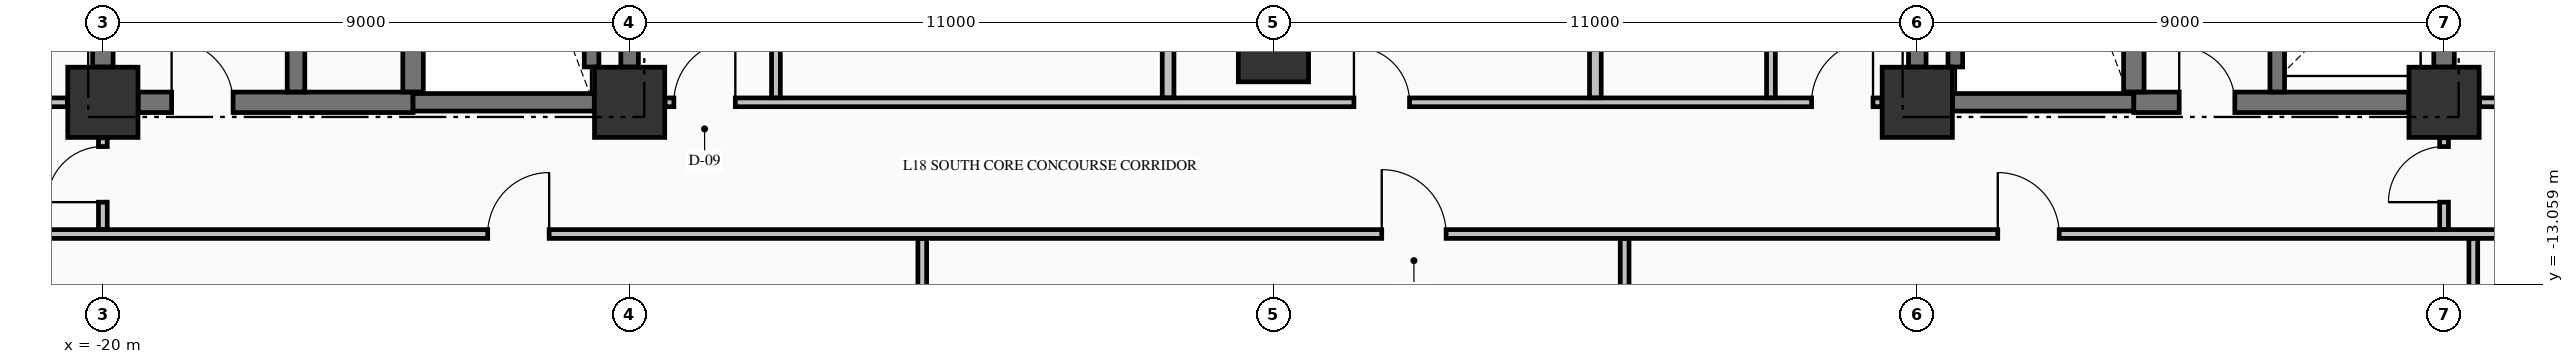
"""IFC4 building model, lengths in metres.
Left out: names, types, materials, properties, quantities, classifications, styles, units other than length and angle.
Written with IfcOpenShell. Run it as: python <this file> out.ifc"""

import sys

from ifc_helpers import new_model, si_unit, direction, frame, frame_2d, origin, origin_2d, place, context, subcontext, project, spatial, rectangle, extrude, element, fill, save


model = new_model("IFC4")
c1 = context("Model", 3, precision=1e-05, world=origin(), true_north=direction((0.0, 1.0)))
c2 = subcontext(c1, "Body", "Model", "MODEL_VIEW")
j1 = project(units=[si_unit("LENGTHUNIT", "METRE"), si_unit("PLANEANGLEUNIT", "RADIAN")], contexts=[c1])
p1 = place(None, origin())
s1 = spatial("IfcSite", under=j1, at=p1, CompositionType="ELEMENT")
p2 = place(p1, origin())
s2 = spatial("IfcBuilding", under=s1, at=p2, CompositionType="ELEMENT")
p3 = place(p2, frame((0.0, 0.0, 75.04)))
s3 = spatial("IfcBuildingStorey", under=s2, at=p3, CompositionType="ELEMENT", Elevation=75.04)
for number, where, z_axis, x_axis in (
    (1, (-20.0, -9.95, -0.25), (0.0, 0.0, 1.0), (1.0, 0.0, 0.0)),
    (2, (-11.0, -9.95, -0.25), (0.0, 0.0, 1.0), (1.0, 0.0, 0.0)),
    (3, (11.0, -9.95, -0.25), (0.0, 0.0, 1.0), (1.0, 0.0, 0.0)),
    (4, (20.0, -9.95, -0.25), (0.0, 0.0, 1.0), (1.0, 0.0, 0.0)),
    (5, (0.0, -9.0, -0.25), (0.0, 0.0, 1.0), (1.0, 0.0, 0.0)),
):
    element("IfcColumn", number, at=place(p3, frame(where, z_axis=z_axis, x_axis=x_axis)), inside=s3, PredefinedType="COLUMN", context=c2, shape_type="SweptSolid", body=[
        extrude(rectangle(XDim=1.2, YDim=1.2, at=origin_2d()), origin(), (0.0, 0.0, 1.0), 3.57),
    ])
p4 = place(p3, frame((-19.396, -9.95, 0.0), z_axis=(0.0, 0.0, 1.0), x_axis=(1.0, 0.0, 0.0)))
e6 = element("IfcWall", 6, at=p4, inside=s3, PredefinedType="SHEAR", context=c2, shape_type="SweptSolid", body=[
    extrude(rectangle(XDim=4.696, YDim=0.35, at=frame_2d((2.348, 0.0))), origin(), (0.0, 0.0, 1.0), 3.32),
])
p5 = place(p4, frame((0.571, 0.0, 0.0)))
e7 = element("IfcOpeningElement", 7, at=p5, cuts=e6, PredefinedType="OPENING", context=c2, shape_type="SweptSolid", body=[
    extrude(rectangle(XDim=1.05, YDim=2.15, at=frame_2d((0.525, 1.075))), frame((0.0, 0.185, 0.0), z_axis=(0.0, -1.0, 0.0), x_axis=(1.0, 0.0, 0.0)), (0.0, 0.0, 1.0), 0.37),
])
for number, where, z_axis, x_axis in (
    (8, (-14.7, -9.95, 0.0), (0.0, 0.0, 1.0), (1.0, 0.0, 0.0)),
    (9, (11.604, -9.95, 0.0), (0.0, 0.0, 1.0), (1.0, 0.0, 0.0)),
):
    element("IfcWall", number, at=place(p3, frame(where, z_axis=z_axis, x_axis=x_axis)), inside=s3, PredefinedType="SHEAR", context=c2, shape_type="SweptSolid", body=[
        extrude(rectangle(XDim=3.096, YDim=0.3, at=frame_2d((1.548, 0.0))), origin(), (0.0, 0.0, 1.0), 3.32),
    ])
p6 = place(p3, frame((14.7, -9.95, 0.0), z_axis=(0.0, 0.0, 1.0), x_axis=(1.0, 0.0, 0.0)))
e10 = element("IfcWall", 10, at=p6, inside=s3, PredefinedType="SHEAR", context=c2, shape_type="SweptSolid", body=[
    extrude(rectangle(XDim=4.696, YDim=0.35, at=frame_2d((2.348, 0.0))), origin(), (0.0, 0.0, 1.0), 3.32),
])
p7 = place(p6, frame((0.775, 0.0, 0.0)))
e11 = element("IfcOpeningElement", 11, at=p7, cuts=e10, PredefinedType="OPENING", context=c2, shape_type="SweptSolid", body=[
    extrude(rectangle(XDim=0.95, YDim=2.15, at=frame_2d((0.475, 1.075))), frame((0.0, 0.185, 0.0), z_axis=(0.0, -1.0, 0.0), x_axis=(1.0, 0.0, 0.0)), (0.0, 0.0, 1.0), 0.37),
])
p8 = place(p3, frame((-28.835, -12.2, 0.0), z_axis=(0.0, 0.0, 1.0), x_axis=(1.0, 0.0, 0.0)))
e12 = element("IfcWall", 12, at=p8, inside=s3, PredefinedType="PARTITIONING", context=c2, shape_type="SweptSolid", body=[
    extrude(rectangle(XDim=52.67, YDim=0.15, at=frame_2d((26.335, 0.0))), origin(), (0.0, 0.0, 1.0), 3.32),
])
p9 = place(p8, frame((30.685, 0.0, 0.0)))
e13 = element("IfcOpeningElement", 13, at=p9, cuts=e12, PredefinedType="OPENING", context=c2, shape_type="SweptSolid", body=[
    extrude(rectangle(XDim=1.1, YDim=2.15, at=frame_2d((0.55, 1.075))), frame((0.0, 0.085, 0.0), z_axis=(0.0, -1.0, 0.0), x_axis=(1.0, 0.0, 0.0)), (0.0, 0.0, 1.0), 0.17),
])
p10 = place(p8, frame((15.41, 0.0, 0.0)))
e14 = element("IfcOpeningElement", 14, at=p10, cuts=e12, PredefinedType="OPENING", context=c2, shape_type="SweptSolid", body=[
    extrude(rectangle(XDim=1.05, YDim=2.15, at=frame_2d((0.525, 1.075))), frame((0.0, 0.085, 0.0), z_axis=(0.0, -1.0, 0.0), x_axis=(1.0, 0.0, 0.0)), (0.0, 0.0, 1.0), 0.17),
])
p11 = place(p8, frame((41.21, 0.0, 0.0)))
e15 = element("IfcOpeningElement", 15, at=p11, cuts=e12, PredefinedType="OPENING", context=c2, shape_type="SweptSolid", body=[
    extrude(rectangle(XDim=1.05, YDim=2.15, at=frame_2d((0.525, 1.075))), frame((0.0, 0.085, 0.0), z_axis=(0.0, -1.0, 0.0), x_axis=(1.0, 0.0, 0.0)), (0.0, 0.0, 1.0), 0.17),
])
p12 = place(p3, frame((-28.835, -9.95, 0.0), z_axis=(0.0, 0.0, 1.0), x_axis=(1.0, 0.0, 0.0)))
e16 = element("IfcWall", 16, at=p12, inside=s3, PredefinedType="PARTITIONING", context=c2, shape_type="SweptSolid", body=[
    extrude(rectangle(XDim=8.229, YDim=0.15, at=frame_2d((4.115, 0.0))), origin(), (0.0, 0.0, 1.0), 3.32),
])
p13 = place(p12, frame((3.835, 0.0, 0.0)))
e17 = element("IfcOpeningElement", 17, at=p13, cuts=e16, PredefinedType="OPENING", context=c2, shape_type="SweptSolid", body=[
    extrude(rectangle(XDim=1.0, YDim=2.15, at=frame_2d((0.5, 1.075))), frame((0.0, 0.085, 0.0), z_axis=(0.0, -1.0, 0.0), x_axis=(1.0, 0.0, 0.0)), (0.0, 0.0, 1.0), 0.17),
])
p14 = place(p3, frame((-10.394, -9.95, 0.0), z_axis=(0.0, 0.0, 1.0), x_axis=(1.0, 0.0, 0.0)))
e18 = element("IfcWall", 18, at=p14, inside=s3, PredefinedType="PARTITIONING", context=c2, shape_type="SweptSolid", body=[
    extrude(rectangle(XDim=20.788, YDim=0.15, at=frame_2d((10.394, 0.0))), origin(), (0.0, 0.0, 1.0), 3.32),
])
p15 = place(p14, frame((0.15, 0.0, 0.0)))
e19 = element("IfcOpeningElement", 19, at=p15, cuts=e18, PredefinedType="OPENING", context=c2, shape_type="SweptSolid", body=[
    extrude(rectangle(XDim=1.05, YDim=2.15, at=frame_2d((0.525, 1.075))), frame((0.0, 0.085, 0.0), z_axis=(0.0, -1.0, 0.0), x_axis=(1.0, 0.0, 0.0)), (0.0, 0.0, 1.0), 0.17),
])
p16 = place(p14, frame((19.588, 0.0, 0.0)))
e20 = element("IfcOpeningElement", 20, at=p16, cuts=e18, PredefinedType="OPENING", context=c2, shape_type="SweptSolid", body=[
    extrude(rectangle(XDim=1.05, YDim=2.15, at=frame_2d((0.525, 1.075))), frame((0.0, 0.085, 0.0), z_axis=(0.0, -1.0, 0.0), x_axis=(1.0, 0.0, 0.0)), (0.0, 0.0, 1.0), 0.17),
])
p17 = place(p14, frame((11.769, 0.0, 0.0)))
e21 = element("IfcOpeningElement", 21, at=p17, cuts=e18, PredefinedType="OPENING", context=c2, shape_type="SweptSolid", body=[
    extrude(rectangle(XDim=0.95, YDim=2.15, at=frame_2d((0.475, 1.075))), frame((0.0, 0.085, 0.0), z_axis=(0.0, -1.0, 0.0), x_axis=(1.0, 0.0, 0.0)), (0.0, 0.0, 1.0), 0.17),
])
p18 = place(p3, frame((20.606, -9.95, 0.0), z_axis=(0.0, 0.0, 1.0), x_axis=(1.0, 0.0, 0.0)))
e22 = element("IfcWall", 22, at=p18, inside=s3, PredefinedType="PARTITIONING", context=c2, shape_type="SweptSolid", body=[
    extrude(rectangle(XDim=3.229, YDim=0.15, at=frame_2d((1.615, 0.0))), origin(), (0.0, 0.0, 1.0), 3.32),
])
p19 = place(p18, frame((0.919, 0.0, 0.0)))
e23 = element("IfcOpeningElement", 23, at=p19, cuts=e22, PredefinedType="OPENING", context=c2, shape_type="SweptSolid", body=[
    extrude(rectangle(XDim=0.95, YDim=2.15, at=frame_2d((0.475, 1.075))), frame((0.0, 0.085, 0.0), z_axis=(0.0, -1.0, 0.0), x_axis=(1.0, 0.0, 0.0)), (0.0, 0.0, 1.0), 0.17),
])
p20 = place(p3, frame((-20.0, -9.346, 0.0), z_axis=(0.0, 0.0, 1.0), x_axis=(0.0, 1.0, 0.0)))
e24 = element("IfcWall", 24, at=p20, inside=s3, PredefinedType="SHEAR", context=c2, shape_type="SweptSolid", body=[
    extrude(rectangle(XDim=8.742, YDim=0.35, at=frame_2d((4.371, 0.0))), origin(), (0.0, 0.0, 1.0), 3.32),
])
p21 = place(p3, frame((-16.7, -9.773, 0.0), z_axis=(0.0, 0.0, 1.0), x_axis=(0.0, 1.0, 0.0)))
e25 = element("IfcWall", 25, at=p21, inside=s3, PredefinedType="SHEAR", context=c2, shape_type="SweptSolid", body=[
    extrude(rectangle(XDim=9.371, YDim=0.3, at=frame_2d((4.686, 0.0))), origin(), (0.0, 0.0, 1.0), 3.32),
])
p22 = place(p3, frame((-14.7, -9.773, 0.0), z_axis=(0.0, 0.0, 1.0), x_axis=(0.0, 1.0, 0.0)))
e26 = element("IfcWall", 26, at=p22, inside=s3, PredefinedType="SHEAR", context=c2, shape_type="SweptSolid", body=[
    extrude(rectangle(XDim=9.371, YDim=0.35, at=frame_2d((4.686, 0.0))), origin(), (0.0, 0.0, 1.0), 3.32),
])
p23 = place(p3, frame((-11.65, -9.346, 0.0), z_axis=(0.0, 0.0, 1.0), x_axis=(0.0, 1.0, 0.0)))
e27 = element("IfcWall", 27, at=p23, inside=s3, PredefinedType="SOLIDWALL", context=c2, shape_type="SweptSolid", body=[
    extrude(rectangle(XDim=8.742, YDim=0.25, at=frame_2d((4.371, 0.0))), origin(), (0.0, 0.0, 1.0), 3.32),
])
for number, where, z_axis, x_axis in (
    (28, (-11.0, -9.346, 0.0), (0.0, 0.0, 1.0), (0.0, 1.0, 0.0)),
    (29, (11.0, -9.346, 0.0), (0.0, 0.0, 1.0), (0.0, 1.0, 0.0)),
):
    element("IfcWall", number, at=place(p3, frame(where, z_axis=z_axis, x_axis=x_axis)), inside=s3, PredefinedType="SHEAR", context=c2, shape_type="SweptSolid", body=[
        extrude(rectangle(XDim=8.742, YDim=0.3, at=frame_2d((4.371, 0.0))), origin(), (0.0, 0.0, 1.0), 3.32),
    ])
p24 = place(p3, frame((11.65, -9.346, 0.0), z_axis=(0.0, 0.0, 1.0), x_axis=(0.0, 1.0, 0.0)))
e30 = element("IfcWall", 30, at=p24, inside=s3, PredefinedType="SOLIDWALL", context=c2, shape_type="SweptSolid", body=[
    extrude(rectangle(XDim=8.742, YDim=0.25, at=frame_2d((4.371, 0.0))), origin(), (0.0, 0.0, 1.0), 3.32),
])
p25 = place(p3, frame((14.7, -9.773, 0.0), z_axis=(0.0, 0.0, 1.0), x_axis=(0.0, 1.0, 0.0)))
e31 = element("IfcWall", 31, at=p25, inside=s3, PredefinedType="SHEAR", context=c2, shape_type="SweptSolid", body=[
    extrude(rectangle(XDim=9.371, YDim=0.35, at=frame_2d((4.686, 0.0))), origin(), (0.0, 0.0, 1.0), 3.32),
])
p26 = place(p3, frame((17.15, -9.773, 0.0), z_axis=(0.0, 0.0, 1.0), x_axis=(0.0, 1.0, 0.0)))
e32 = element("IfcWall", 32, at=p26, inside=s3, PredefinedType="SOLIDWALL", context=c2, shape_type="SweptSolid", body=[
    extrude(rectangle(XDim=2.596, YDim=0.25, at=frame_2d((1.298, 0.0))), origin(), (0.0, 0.0, 1.0), 3.32),
])
p27 = place(p3, frame((20.0, -9.346, 0.0), z_axis=(0.0, 0.0, 1.0), x_axis=(0.0, 1.0, 0.0)))
e33 = element("IfcWall", 33, at=p27, inside=s3, PredefinedType="SHEAR", context=c2, shape_type="SweptSolid", body=[
    extrude(rectangle(XDim=2.169, YDim=0.35, at=frame_2d((1.084, 0.0))), origin(), (0.0, 0.0, 1.0), 3.32),
])
p28 = place(p3, frame((-20.0, -12.122, 0.0), z_axis=(0.0, 0.0, 1.0), x_axis=(0.0, 1.0, 0.0)))
e34 = element("IfcWall", 34, at=p28, inside=s3, PredefinedType="PARTITIONING", context=c2, shape_type="SweptSolid", body=[
    extrude(rectangle(XDim=1.566, YDim=0.15, at=frame_2d((0.783, 0.0))), origin(), (0.0, 0.0, 1.0), 2.66),
])
p29 = place(p28, frame((0.466, 0.0, 0.0)))
e35 = element("IfcOpeningElement", 35, at=p29, cuts=e34, PredefinedType="OPENING", context=c2, shape_type="SweptSolid", body=[
    extrude(rectangle(XDim=0.95, YDim=2.15, at=frame_2d((0.475, 1.075))), frame((0.0, 0.085, 0.0), z_axis=(0.0, -1.0, 0.0), x_axis=(1.0, 0.0, 0.0)), (0.0, 0.0, 1.0), 0.17),
])
p30 = place(p3, frame((-8.5, -9.872, 0.0), z_axis=(0.0, 0.0, 1.0), x_axis=(0.0, 1.0, 0.0)))
e36 = element("IfcWall", 36, at=p30, inside=s3, PredefinedType="PARTITIONING", context=c2, shape_type="SweptSolid", body=[
    extrude(rectangle(XDim=10.569, YDim=0.15, at=frame_2d((5.285, 0.0))), origin(), (0.0, 0.0, 1.0), 3.32),
])
p31 = place(p30, frame((4.827, 0.0, 0.0)))
e37 = element("IfcOpeningElement", 37, at=p31, cuts=e36, PredefinedType="OPENING", context=c2, shape_type="SweptSolid", body=[
    extrude(rectangle(XDim=0.95, YDim=2.15, at=frame_2d((0.475, 1.075))), frame((0.0, 0.085, 0.0), z_axis=(0.0, -1.0, 0.0), x_axis=(1.0, 0.0, 0.0)), (0.0, 0.0, 1.0), 0.17),
])
p32 = place(p3, frame((-6.0, -18.472, 0.0), z_axis=(0.0, 0.0, 1.0), x_axis=(0.0, 1.0, 0.0)))
e38 = element("IfcWall", 38, at=p32, inside=s3, PredefinedType="PARTITIONING", context=c2, shape_type="SweptSolid", body=[
    extrude(rectangle(XDim=6.194, YDim=0.15, at=frame_2d((3.097, 0.0))), origin(), (0.0, 0.0, 1.0), 3.32),
])
for number, where, z_axis, x_axis in (
    (39, (-1.8, -9.872, 0.0), (0.0, 0.0, 1.0), (0.0, 1.0, 0.0)),
    (40, (5.5, -9.872, 0.0), (0.0, 0.0, 1.0), (0.0, 1.0, 0.0)),
):
    element("IfcWall", number, at=place(p3, frame(where, z_axis=z_axis, x_axis=x_axis)), inside=s3, PredefinedType="PARTITIONING", context=c2, shape_type="SweptSolid", body=[
        extrude(rectangle(XDim=4.969, YDim=0.2, at=frame_2d((2.484, 0.0))), origin(), (0.0, 0.0, 1.0), 3.32),
    ])
p33 = place(p3, frame((6.0, -18.472, 0.0), z_axis=(0.0, 0.0, 1.0), x_axis=(0.0, 1.0, 0.0)))
e41 = element("IfcWall", 41, at=p33, inside=s3, PredefinedType="PARTITIONING", context=c2, shape_type="SweptSolid", body=[
    extrude(rectangle(XDim=6.194, YDim=0.15, at=frame_2d((3.097, 0.0))), origin(), (0.0, 0.0, 1.0), 3.32),
])
p34 = place(p3, frame((8.5, -9.872, 0.0), z_axis=(0.0, 0.0, 1.0), x_axis=(0.0, 1.0, 0.0)))
e42 = element("IfcWall", 42, at=p34, inside=s3, PredefinedType="PARTITIONING", context=c2, shape_type="SweptSolid", body=[
    extrude(rectangle(XDim=4.969, YDim=0.15, at=frame_2d((2.484, 0.0))), origin(), (0.0, 0.0, 1.0), 3.32),
])
p35 = place(p34, frame((1.997, 0.0, 0.0)))
e43 = element("IfcOpeningElement", 43, at=p35, cuts=e42, PredefinedType="OPENING", context=c2, shape_type="SweptSolid", body=[
    extrude(rectangle(XDim=0.95, YDim=2.15, at=frame_2d((0.475, 1.075))), frame((0.0, 0.085, 0.0), z_axis=(0.0, -1.0, 0.0), x_axis=(1.0, 0.0, 0.0)), (0.0, 0.0, 1.0), 0.17),
])
p36 = place(p3, frame((20.0, -12.122, 0.0), z_axis=(0.0, 0.0, 1.0), x_axis=(0.0, 1.0, 0.0)))
e44 = element("IfcWall", 44, at=p36, inside=s3, PredefinedType="PARTITIONING", context=c2, shape_type="SweptSolid", body=[
    extrude(rectangle(XDim=1.566, YDim=0.15, at=frame_2d((0.783, 0.0))), origin(), (0.0, 0.0, 1.0), 3.32),
])
p37 = place(p36, frame((0.466, 0.0, 0.0)))
e45 = element("IfcOpeningElement", 45, at=p37, cuts=e44, PredefinedType="OPENING", context=c2, shape_type="SweptSolid", body=[
    extrude(rectangle(XDim=0.95, YDim=2.15, at=frame_2d((0.475, 1.075))), frame((0.0, 0.085, 0.0), z_axis=(0.0, -1.0, 0.0), x_axis=(1.0, 0.0, 0.0)), (0.0, 0.0, 1.0), 0.17),
])
p38 = place(p3, frame((20.5, -22.294, 0.0), z_axis=(0.0, 0.0, 1.0), x_axis=(0.0, 1.0, 0.0)))
e46 = element("IfcWall", 46, at=p38, inside=s3, PredefinedType="PARTITIONING", context=c2, shape_type="SweptSolid", body=[
    extrude(rectangle(XDim=10.016, YDim=0.15, at=frame_2d((5.008, 0.0))), origin(), (0.0, 0.0, 1.0), 3.32),
])
p39 = place(p5, origin())
e47 = element("IfcDoor", 47, at=p39, inside=s3, OperationType="SINGLE_SWING_LEFT", PredefinedType="DOOR", context=c2, shape_type="SweptSolid", body=[
    extrude(rectangle(XDim=1.05, YDim=2.15, at=frame_2d((0.525, 1.075))), frame((0.0, 0.025, 0.0), z_axis=(0.0, -1.0, 0.0), x_axis=(1.0, 0.0, 0.0)), (0.0, 0.0, 1.0), 0.05),
])
fill(e7, e47)
p40 = place(p7, origin())
e48 = element("IfcDoor", 48, at=p40, inside=s3, OperationType="SINGLE_SWING_LEFT", PredefinedType="DOOR", context=c2, shape_type="SweptSolid", body=[
    extrude(rectangle(XDim=0.95, YDim=2.15, at=frame_2d((0.475, 1.075))), frame((0.0, 0.025, 0.0), z_axis=(0.0, -1.0, 0.0), x_axis=(1.0, 0.0, 0.0)), (0.0, 0.0, 1.0), 0.05),
])
fill(e11, e48)
p41 = place(p15, origin())
e49 = element("IfcDoor", 49, at=p41, inside=s3, OperationType="SINGLE_SWING_RIGHT", PredefinedType="DOOR", context=c2, shape_type="SweptSolid", body=[
    extrude(rectangle(XDim=1.05, YDim=2.15, at=frame_2d((0.525, 1.075))), frame((0.0, 0.025, 0.0), z_axis=(0.0, -1.0, 0.0), x_axis=(1.0, 0.0, 0.0)), (0.0, 0.0, 1.0), 0.05),
])
fill(e19, e49)
p42 = place(p16, origin())
e50 = element("IfcDoor", 50, at=p42, inside=s3, OperationType="SINGLE_SWING_RIGHT", PredefinedType="DOOR", context=c2, shape_type="SweptSolid", body=[
    extrude(rectangle(XDim=1.05, YDim=2.15, at=frame_2d((0.525, 1.075))), frame((0.0, 0.025, 0.0), z_axis=(0.0, -1.0, 0.0), x_axis=(1.0, 0.0, 0.0)), (0.0, 0.0, 1.0), 0.05),
])
fill(e20, e50)
p43 = place(p9, origin())
e51 = element("IfcDoor", 51, at=p43, inside=s3, OperationType="SINGLE_SWING_LEFT", PredefinedType="DOOR", context=c2, shape_type="SweptSolid", body=[
    extrude(rectangle(XDim=1.1, YDim=2.15, at=frame_2d((0.55, 1.075))), frame((0.0, 0.025, 0.0), z_axis=(0.0, -1.0, 0.0), x_axis=(1.0, 0.0, 0.0)), (0.0, 0.0, 1.0), 0.05),
])
fill(e13, e51)
p44 = place(p10, origin())
e52 = element("IfcDoor", 52, at=p44, inside=s3, OperationType="SINGLE_SWING_RIGHT", PredefinedType="DOOR", context=c2, shape_type="SweptSolid", body=[
    extrude(rectangle(XDim=1.05, YDim=2.15, at=frame_2d((0.525, 1.075))), frame((0.0, 0.025, 0.0), z_axis=(0.0, -1.0, 0.0), x_axis=(1.0, 0.0, 0.0)), (0.0, 0.0, 1.0), 0.05),
])
fill(e14, e52)
p45 = place(p11, origin())
e53 = element("IfcDoor", 53, at=p45, inside=s3, OperationType="SINGLE_SWING_LEFT", PredefinedType="DOOR", context=c2, shape_type="SweptSolid", body=[
    extrude(rectangle(XDim=1.05, YDim=2.15, at=frame_2d((0.525, 1.075))), frame((0.0, 0.025, 0.0), z_axis=(0.0, -1.0, 0.0), x_axis=(1.0, 0.0, 0.0)), (0.0, 0.0, 1.0), 0.05),
])
fill(e15, e53)
p46 = place(p17, origin())
e54 = element("IfcDoor", 54, at=p46, inside=s3, OperationType="SINGLE_SWING_LEFT", PredefinedType="DOOR", context=c2, shape_type="SweptSolid", body=[
    extrude(rectangle(XDim=0.95, YDim=2.15, at=frame_2d((0.475, 1.075))), frame((0.0, 0.025, 0.0), z_axis=(0.0, -1.0, 0.0), x_axis=(1.0, 0.0, 0.0)), (0.0, 0.0, 1.0), 0.05),
])
fill(e21, e54)
p47 = place(p29, origin())
e55 = element("IfcDoor", 55, at=p47, inside=s3, OperationType="SINGLE_SWING_LEFT", PredefinedType="DOOR", context=c2, shape_type="SweptSolid", body=[
    extrude(rectangle(XDim=0.95, YDim=2.15, at=frame_2d((0.475, 1.075))), frame((0.0, 0.025, 0.0), z_axis=(0.0, -1.0, 0.0), x_axis=(1.0, 0.0, 0.0)), (0.0, 0.0, 1.0), 0.05),
])
fill(e35, e55)
p48 = place(p37, origin())
e56 = element("IfcDoor", 56, at=p48, inside=s3, OperationType="SINGLE_SWING_LEFT", PredefinedType="DOOR", context=c2, shape_type="SweptSolid", body=[
    extrude(rectangle(XDim=0.95, YDim=2.15, at=frame_2d((0.475, 1.075))), frame((0.0, 0.025, 0.0), z_axis=(0.0, -1.0, 0.0), x_axis=(1.0, 0.0, 0.0)), (0.0, 0.0, 1.0), 0.05),
])
fill(e45, e56)
save(model, sys.argv[1])
